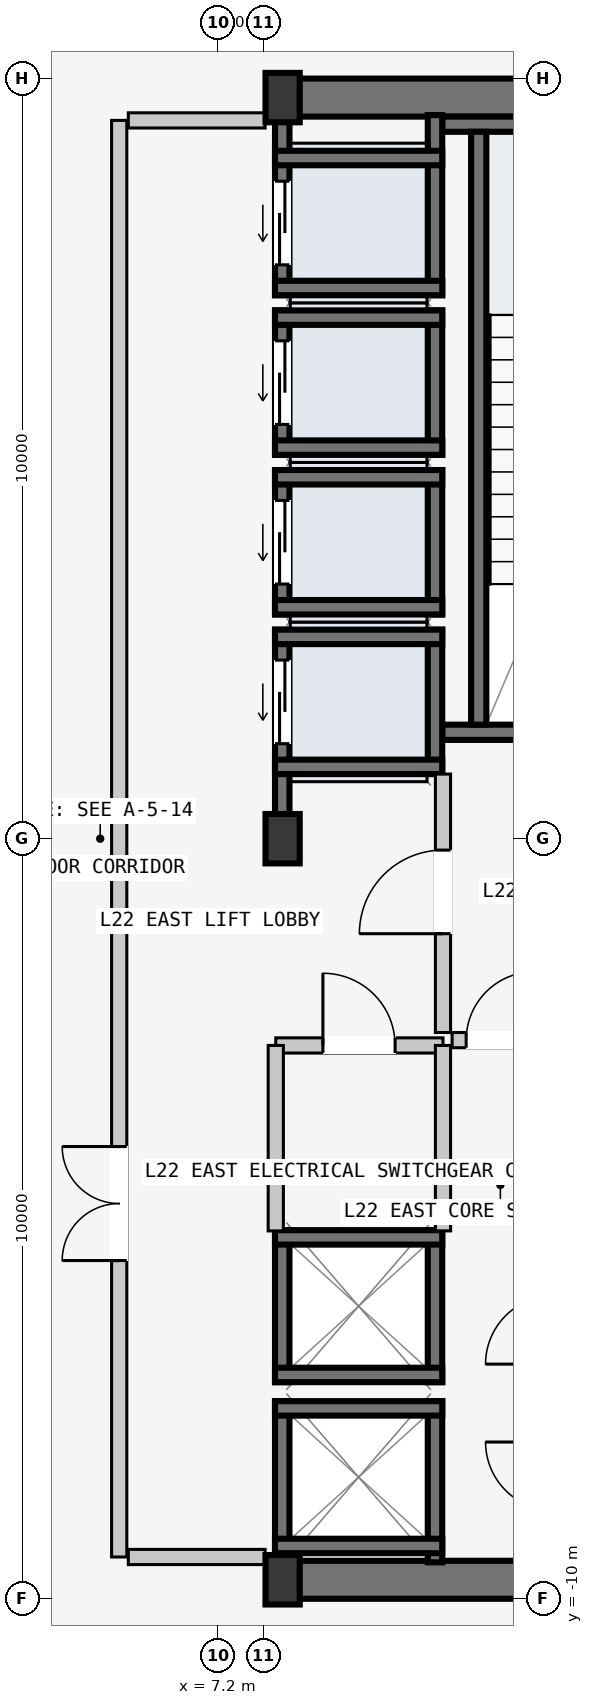
"""IFC4 building model, lengths in metres.
Left out: names, types, materials, properties, quantities, classifications, styles, units other than length and angle.
Written with IfcOpenShell. Run it as: python <this file> out.ifc"""

import sys

from ifc_helpers import new_model, si_unit, direction, frame, frame_2d, origin, origin_2d, place, context, subcontext, project, spatial, rectangle, i_section, extrude, element, fill, save


model = new_model("IFC4")
c1 = context("Model", 3, precision=1e-05, world=origin(), true_north=direction((0.0, 1.0)))
c2 = subcontext(c1, "Body", "Model", "MODEL_VIEW")
j1 = project(units=[si_unit("LENGTHUNIT", "METRE"), si_unit("PLANEANGLEUNIT", "RADIAN")], contexts=[c1])
p1 = place(None, origin())
s1 = spatial("IfcSite", under=j1, at=p1, CompositionType="ELEMENT")
p2 = place(p1, origin())
s2 = spatial("IfcBuilding", under=s1, at=p2, CompositionType="ELEMENT")
p3 = place(p2, frame((0.0, 0.0, 87.3)))
s3 = spatial("IfcBuildingStorey", under=s2, at=p3, CompositionType="ELEMENT", Elevation=87.3)
for number, where, z_axis, x_axis in (
    (1, (8.07, -9.75, -0.2), (0.0, 0.0, 1.0), (1.0, 0.0, 0.0)),
    (2, (8.07, 9.75, -0.2), (0.0, 0.0, 1.0), (1.0, 0.0, 0.0)),
):
    element("IfcWall", number, at=place(p3, frame(where, z_axis=z_axis, x_axis=x_axis)), inside=s3, PredefinedType="SHEAR", context=c2, shape_type="SweptSolid", body=[
        extrude(rectangle(XDim=6.46, YDim=0.5, at=frame_2d((3.23, 0.0))), origin(), (0.0, 0.0, 1.0), 4.5),
    ])
p4 = place(p3, frame((10.15, 1.4, -0.2), z_axis=(0.0, 0.0, 1.0), x_axis=(1.0, 0.0, 0.0)))
e3 = element("IfcWall", 3, at=p4, inside=s3, PredefinedType="SOLIDWALL", context=c2, shape_type="SweptSolid", body=[
    extrude(rectangle(XDim=4.1, YDim=0.2, at=frame_2d((2.05, 0.0))), origin(), (0.0, 0.0, 1.0), 4.5),
])
p5 = place(p4, frame((1.5, 0.0, 0.2)))
e4 = element("IfcOpeningElement", 4, at=p5, cuts=e3, PredefinedType="OPENING", context=c2, shape_type="SweptSolid", body=[
    extrude(rectangle(XDim=1.12, YDim=2.18, at=frame_2d((0.56, 1.09))), frame((0.0, 0.11, 0.0), z_axis=(0.0, -1.0, 0.0), x_axis=(1.0, 0.0, 0.0)), (0.0, 0.0, 1.0), 0.22),
])
p6 = place(p3, frame((10.15, 9.4, -0.2), z_axis=(0.0, 0.0, 1.0), x_axis=(1.0, 0.0, 0.0)))
e5 = element("IfcWall", 5, at=p6, inside=s3, PredefinedType="SOLIDWALL", context=c2, shape_type="SweptSolid", body=[
    extrude(rectangle(XDim=4.1, YDim=0.2, at=frame_2d((2.05, 0.0))), origin(), (0.0, 0.0, 1.0), 4.5),
])
p7 = place(p3, frame((10.63, 1.5, -0.2), z_axis=(0.0, 0.0, 1.0), x_axis=(0.0, 1.0, 0.0)))
e6 = element("IfcWall", 6, at=p7, inside=s3, PredefinedType="SOLIDWALL", context=c2, shape_type="SweptSolid", body=[
    extrude(rectangle(XDim=7.8, YDim=0.2, at=frame_2d((3.9, 0.0))), origin(), (0.0, 0.0, 1.0), 4.5),
])
for number, where, z_axis, x_axis in (
    (7, (8.05, -9.75, 0.0), (0.0, 0.0, 1.0), (1.0, 0.0, 0.0)),
    (8, (8.05, 0.0, 0.0), (0.0, 0.0, 1.0), (1.0, 0.0, 0.0)),
    (9, (8.05, 9.75, 0.0), (0.0, 0.0, 1.0), (1.0, 0.0, 0.0)),
):
    element("IfcColumn", number, at=place(p3, frame(where, z_axis=z_axis, x_axis=x_axis)), inside=s3, PredefinedType="COLUMN", context=c2, shape_type="SweptSolid", body=[
        extrude(i_section(OverallWidth=0.45, OverallDepth=0.65, WebThickness=0.025, FlangeThickness=0.04, at=origin_2d()), origin(), (0.0, 0.0, 1.0), 4.5),
    ])
p8 = place(p3, frame((8.045, 0.21, -0.2), z_axis=(0.0, 0.0, 1.0), x_axis=(0.0, 1.0, 0.0)))
e10 = element("IfcWall", 10, at=p8, inside=s3, PredefinedType="SOLIDWALL", context=c2, shape_type="SweptSolid", body=[
    extrude(rectangle(XDim=2.54, YDim=0.19, at=frame_2d((1.27, 0.0))), origin(), (0.0, 0.0, 1.0), 4.5),
])
p9 = place(p8, frame((1.04, 0.0, 0.2)))
e11 = element("IfcOpeningElement", 11, at=p9, cuts=e10, PredefinedType="OPENING", context=c2, shape_type="SweptSolid", body=[
    extrude(rectangle(XDim=1.1, YDim=2.2, at=frame_2d((0.55, 1.1))), frame((0.0, 0.105, 0.0), z_axis=(0.0, -1.0, 0.0), x_axis=(1.0, 0.0, 0.0)), (0.0, 0.0, 1.0), 0.21),
])
p10 = place(p3, frame((10.055, 0.85, -0.2), z_axis=(0.0, 0.0, 1.0), x_axis=(0.0, 1.0, 0.0)))
e12 = element("IfcWall", 12, at=p10, inside=s3, PredefinedType="SOLIDWALL", context=c2, shape_type="SweptSolid", body=[
    extrude(rectangle(XDim=1.9, YDim=0.19, at=frame_2d((0.95, 0.0))), origin(), (0.0, 0.0, 1.0), 4.5),
])
for number, where, z_axis, x_axis in (
    (13, (7.95, 2.655, -0.2), (0.0, 0.0, 1.0), (1.0, 0.0, 0.0)),
    (14, (7.95, 0.945, -0.2), (0.0, 0.0, 1.0), (1.0, 0.0, 0.0)),
):
    element("IfcWall", number, at=place(p3, frame(where, z_axis=z_axis, x_axis=x_axis)), inside=s3, PredefinedType="SOLIDWALL", context=c2, shape_type="SweptSolid", body=[
        extrude(rectangle(XDim=2.2, YDim=0.19, at=frame_2d((1.1, 0.0))), origin(), (0.0, 0.0, 1.0), 4.5),
    ])
p11 = place(p3, frame((8.045, 2.95, -0.2), z_axis=(0.0, 0.0, 1.0), x_axis=(0.0, 1.0, 0.0)))
e15 = element("IfcWall", 15, at=p11, inside=s3, PredefinedType="SOLIDWALL", context=c2, shape_type="SweptSolid", body=[
    extrude(rectangle(XDim=1.9, YDim=0.19, at=frame_2d((0.95, 0.0))), origin(), (0.0, 0.0, 1.0), 4.5),
])
p12 = place(p11, frame((0.4, 0.0, 0.2)))
e16 = element("IfcOpeningElement", 16, at=p12, cuts=e15, PredefinedType="OPENING", context=c2, shape_type="SweptSolid", body=[
    extrude(rectangle(XDim=1.1, YDim=2.2, at=frame_2d((0.55, 1.1))), frame((0.0, 0.105, 0.0), z_axis=(0.0, -1.0, 0.0), x_axis=(1.0, 0.0, 0.0)), (0.0, 0.0, 1.0), 0.21),
])
p13 = place(p3, frame((10.055, 2.95, -0.2), z_axis=(0.0, 0.0, 1.0), x_axis=(0.0, 1.0, 0.0)))
e17 = element("IfcWall", 17, at=p13, inside=s3, PredefinedType="SOLIDWALL", context=c2, shape_type="SweptSolid", body=[
    extrude(rectangle(XDim=1.9, YDim=0.19, at=frame_2d((0.95, 0.0))), origin(), (0.0, 0.0, 1.0), 4.5),
])
for number, where, z_axis, x_axis in (
    (18, (7.95, 4.755, -0.2), (0.0, 0.0, 1.0), (1.0, 0.0, 0.0)),
    (19, (7.95, 3.045, -0.2), (0.0, 0.0, 1.0), (1.0, 0.0, 0.0)),
):
    element("IfcWall", number, at=place(p3, frame(where, z_axis=z_axis, x_axis=x_axis)), inside=s3, PredefinedType="SOLIDWALL", context=c2, shape_type="SweptSolid", body=[
        extrude(rectangle(XDim=2.2, YDim=0.19, at=frame_2d((1.1, 0.0))), origin(), (0.0, 0.0, 1.0), 4.5),
    ])
p14 = place(p3, frame((8.045, 5.05, -0.2), z_axis=(0.0, 0.0, 1.0), x_axis=(0.0, 1.0, 0.0)))
e20 = element("IfcWall", 20, at=p14, inside=s3, PredefinedType="SOLIDWALL", context=c2, shape_type="SweptSolid", body=[
    extrude(rectangle(XDim=1.9, YDim=0.19, at=frame_2d((0.95, 0.0))), origin(), (0.0, 0.0, 1.0), 4.5),
])
p15 = place(p14, frame((0.4, 0.0, 0.2)))
e21 = element("IfcOpeningElement", 21, at=p15, cuts=e20, PredefinedType="OPENING", context=c2, shape_type="SweptSolid", body=[
    extrude(rectangle(XDim=1.1, YDim=2.2, at=frame_2d((0.55, 1.1))), frame((0.0, 0.105, 0.0), z_axis=(0.0, -1.0, 0.0), x_axis=(1.0, 0.0, 0.0)), (0.0, 0.0, 1.0), 0.21),
])
p16 = place(p3, frame((10.055, 5.05, -0.2), z_axis=(0.0, 0.0, 1.0), x_axis=(0.0, 1.0, 0.0)))
e22 = element("IfcWall", 22, at=p16, inside=s3, PredefinedType="SOLIDWALL", context=c2, shape_type="SweptSolid", body=[
    extrude(rectangle(XDim=1.9, YDim=0.19, at=frame_2d((0.95, 0.0))), origin(), (0.0, 0.0, 1.0), 4.5),
])
for number, where, z_axis, x_axis in (
    (23, (7.95, 6.855, -0.2), (0.0, 0.0, 1.0), (1.0, 0.0, 0.0)),
    (24, (7.95, 5.145, -0.2), (0.0, 0.0, 1.0), (1.0, 0.0, 0.0)),
):
    element("IfcWall", number, at=place(p3, frame(where, z_axis=z_axis, x_axis=x_axis)), inside=s3, PredefinedType="SOLIDWALL", context=c2, shape_type="SweptSolid", body=[
        extrude(rectangle(XDim=2.2, YDim=0.19, at=frame_2d((1.1, 0.0))), origin(), (0.0, 0.0, 1.0), 4.5),
    ])
p17 = place(p3, frame((8.045, 7.15, -0.2), z_axis=(0.0, 0.0, 1.0), x_axis=(0.0, 1.0, 0.0)))
e25 = element("IfcWall", 25, at=p17, inside=s3, PredefinedType="SOLIDWALL", context=c2, shape_type="SweptSolid", body=[
    extrude(rectangle(XDim=2.37, YDim=0.19, at=frame_2d((1.185, 0.0))), origin(), (0.0, 0.0, 1.0), 4.5),
])
p18 = place(p17, frame((0.4, 0.0, 0.2)))
e26 = element("IfcOpeningElement", 26, at=p18, cuts=e25, PredefinedType="OPENING", context=c2, shape_type="SweptSolid", body=[
    extrude(rectangle(XDim=1.1, YDim=2.2, at=frame_2d((0.55, 1.1))), frame((0.0, 0.105, 0.0), z_axis=(0.0, -1.0, 0.0), x_axis=(1.0, 0.0, 0.0)), (0.0, 0.0, 1.0), 0.21),
])
p19 = place(p3, frame((10.055, 7.15, -0.2), z_axis=(0.0, 0.0, 1.0), x_axis=(0.0, 1.0, 0.0)))
e27 = element("IfcWall", 27, at=p19, inside=s3, PredefinedType="SOLIDWALL", context=c2, shape_type="SweptSolid", body=[
    extrude(rectangle(XDim=2.37, YDim=0.19, at=frame_2d((1.185, 0.0))), origin(), (0.0, 0.0, 1.0), 4.5),
])
for number, where, z_axis, x_axis in (
    (28, (7.95, 8.955, -0.2), (0.0, 0.0, 1.0), (1.0, 0.0, 0.0)),
    (29, (7.95, 7.245, -0.2), (0.0, 0.0, 1.0), (1.0, 0.0, 0.0)),
):
    element("IfcWall", number, at=place(p3, frame(where, z_axis=z_axis, x_axis=x_axis)), inside=s3, PredefinedType="SOLIDWALL", context=c2, shape_type="SweptSolid", body=[
        extrude(rectangle(XDim=2.2, YDim=0.19, at=frame_2d((1.1, 0.0))), origin(), (0.0, 0.0, 1.0), 4.5),
    ])
for number, where, z_axis, x_axis in (
    (30, (8.045, -9.52, -0.2), (0.0, 0.0, 1.0), (0.0, 1.0, 0.0)),
    (31, (10.055, -9.52, -0.2), (0.0, 0.0, 1.0), (0.0, 1.0, 0.0)),
):
    element("IfcWall", number, at=place(p3, frame(where, z_axis=z_axis, x_axis=x_axis)), inside=s3, PredefinedType="SOLIDWALL", context=c2, shape_type="SweptSolid", body=[
        extrude(rectangle(XDim=2.12, YDim=0.19, at=frame_2d((1.06, 0.0))), origin(), (0.0, 0.0, 1.0), 4.5),
    ])
for number, where, z_axis, x_axis in (
    (32, (7.95, -7.495, -0.2), (0.0, 0.0, 1.0), (1.0, 0.0, 0.0)),
    (33, (7.95, -9.305, -0.2), (0.0, 0.0, 1.0), (1.0, 0.0, 0.0)),
):
    element("IfcWall", number, at=place(p3, frame(where, z_axis=z_axis, x_axis=x_axis)), inside=s3, PredefinedType="SOLIDWALL", context=c2, shape_type="SweptSolid", body=[
        extrude(rectangle(XDim=2.2, YDim=0.19, at=frame_2d((1.1, 0.0))), origin(), (0.0, 0.0, 1.0), 4.5),
    ])
for number, where, z_axis, x_axis in (
    (34, (8.045, -7.15, -0.2), (0.0, 0.0, 1.0), (0.0, 1.0, 0.0)),
    (35, (10.055, -7.15, -0.2), (0.0, 0.0, 1.0), (0.0, 1.0, 0.0)),
):
    element("IfcWall", number, at=place(p3, frame(where, z_axis=z_axis, x_axis=x_axis)), inside=s3, PredefinedType="SOLIDWALL", context=c2, shape_type="SweptSolid", body=[
        extrude(rectangle(XDim=2.0, YDim=0.19, at=frame_2d((1.0, 0.0))), origin(), (0.0, 0.0, 1.0), 4.5),
    ])
for number, where, z_axis, x_axis in (
    (36, (7.95, -5.245, -0.2), (0.0, 0.0, 1.0), (1.0, 0.0, 0.0)),
    (37, (7.95, -7.055, -0.2), (0.0, 0.0, 1.0), (1.0, 0.0, 0.0)),
):
    element("IfcWall", number, at=place(p3, frame(where, z_axis=z_axis, x_axis=x_axis)), inside=s3, PredefinedType="SOLIDWALL", context=c2, shape_type="SweptSolid", body=[
        extrude(rectangle(XDim=2.2, YDim=0.19, at=frame_2d((1.1, 0.0))), origin(), (0.0, 0.0, 1.0), 4.5),
    ])
p20 = place(p3, frame((5.9, -9.45, 0.0), z_axis=(0.0, 0.0, 1.0), x_axis=(0.0, 1.0, 0.0)))
e38 = element("IfcWall", 38, at=p20, inside=s3, PredefinedType="PARTITIONING", context=c2, shape_type="SweptSolid", body=[
    extrude(rectangle(XDim=18.9, YDim=0.2, at=frame_2d((9.45, 0.0))), origin(), (0.0, 0.0, 1.0), 4.3),
])
p21 = place(p20, frame((3.9, 0.0, 0.0)))
e39 = element("IfcOpeningElement", 39, at=p21, cuts=e38, PredefinedType="OPENING", context=c2, shape_type="SweptSolid", body=[
    extrude(rectangle(XDim=1.5, YDim=2.2, at=frame_2d((0.75, 1.1))), frame((0.0, 0.11, 0.0), z_axis=(0.0, -1.0, 0.0), x_axis=(1.0, 0.0, 0.0)), (0.0, 0.0, 1.0), 0.22),
])
for number, where, z_axis, x_axis in (
    (40, (6.02, -9.45, 0.0), (0.0, 0.0, 1.0), (1.0, 0.0, 0.0)),
    (41, (6.02, 9.45, 0.0), (0.0, 0.0, 1.0), (1.0, 0.0, 0.0)),
):
    element("IfcWall", number, at=place(p3, frame(where, z_axis=z_axis, x_axis=x_axis)), inside=s3, PredefinedType="PARTITIONING", context=c2, shape_type="SweptSolid", body=[
        extrude(rectangle(XDim=1.8, YDim=0.2, at=frame_2d((0.9, 0.0))), origin(), (0.0, 0.0, 1.0), 4.3),
    ])
p22 = place(p3, frame((10.16, -2.55, 0.0), z_axis=(0.0, 0.0, 1.0), x_axis=(0.0, 1.0, 0.0)))
e42 = element("IfcWall", 42, at=p22, inside=s3, PredefinedType="PARTITIONING", context=c2, shape_type="SweptSolid", body=[
    extrude(rectangle(XDim=3.4, YDim=0.2, at=frame_2d((1.7, 0.0))), origin(), (0.0, 0.0, 1.0), 4.3),
])
p23 = place(p22, frame((1.3, 0.0, 0.0)))
e43 = element("IfcOpeningElement", 43, at=p23, cuts=e42, PredefinedType="OPENING", context=c2, shape_type="SweptSolid", body=[
    extrude(rectangle(XDim=1.1, YDim=2.15, at=frame_2d((0.55, 1.075))), frame((0.0, 0.11, 0.0), z_axis=(0.0, -1.0, 0.0), x_axis=(1.0, 0.0, 0.0)), (0.0, 0.0, 1.0), 0.22),
])
p24 = place(p3, frame((10.28, -2.65, 0.0), z_axis=(0.0, 0.0, 1.0), x_axis=(1.0, 0.0, 0.0)))
e44 = element("IfcWall", 44, at=p24, inside=s3, PredefinedType="PARTITIONING", context=c2, shape_type="SweptSolid", body=[
    extrude(rectangle(XDim=1.27, YDim=0.2, at=frame_2d((0.635, 0.0))), origin(), (0.0, 0.0, 1.0), 4.3),
])
p25 = place(p24, frame((0.185, 0.0, 0.0)))
e45 = element("IfcOpeningElement", 45, at=p25, cuts=e44, PredefinedType="OPENING", context=c2, shape_type="SweptSolid", body=[
    extrude(rectangle(XDim=0.9, YDim=2.15, at=frame_2d((0.45, 1.075))), frame((0.0, 0.11, 0.0), z_axis=(0.0, -1.0, 0.0), x_axis=(1.0, 0.0, 0.0)), (0.0, 0.0, 1.0), 0.22),
])
p26 = place(p3, frame((7.96, -2.72, 0.0), z_axis=(0.0, 0.0, 1.0), x_axis=(1.0, 0.0, 0.0)))
e46 = element("IfcWall", 46, at=p26, inside=s3, PredefinedType="PARTITIONING", context=c2, shape_type="SweptSolid", body=[
    extrude(rectangle(XDim=2.2, YDim=0.2, at=frame_2d((1.1, 0.0))), origin(), (0.0, 0.0, 1.0), 4.3),
])
p27 = place(p26, frame((0.62, 0.0, 0.0)))
e47 = element("IfcOpeningElement", 47, at=p27, cuts=e46, PredefinedType="OPENING", context=c2, shape_type="SweptSolid", body=[
    extrude(rectangle(XDim=0.95, YDim=2.1, at=frame_2d((0.475, 1.05))), frame((0.0, 0.11, 0.0), z_axis=(0.0, -1.0, 0.0), x_axis=(1.0, 0.0, 0.0)), (0.0, 0.0, 1.0), 0.22),
])
for number, where, z_axis, x_axis in (
    (48, (7.96, -5.16, 0.0), (0.0, 0.0, 1.0), (0.0, 1.0, 0.0)),
    (49, (10.16, -5.16, 0.0), (0.0, 0.0, 1.0), (0.0, 1.0, 0.0)),
):
    element("IfcWall", number, at=place(p3, frame(where, z_axis=z_axis, x_axis=x_axis)), inside=s3, PredefinedType="PARTITIONING", context=c2, shape_type="SweptSolid", body=[
        extrude(rectangle(XDim=2.44, YDim=0.2, at=frame_2d((1.22, 0.0))), origin(), (0.0, 0.0, 1.0), 4.3),
    ])
p28 = place(p9, origin())
e50 = element("IfcDoor", 50, at=p28, inside=s3, OperationType="SLIDING_TO_LEFT", PredefinedType="DOOR", context=c2, shape_type="SweptSolid", body=[
    extrude(rectangle(XDim=1.1, YDim=2.2, at=frame_2d((0.55, 1.1))), frame((0.0, 0.025, 0.0), z_axis=(0.0, -1.0, 0.0), x_axis=(1.0, 0.0, 0.0)), (0.0, 0.0, 1.0), 0.05),
])
fill(e11, e50)
p29 = place(p12, origin())
e51 = element("IfcDoor", 51, at=p29, inside=s3, OperationType="SLIDING_TO_LEFT", PredefinedType="DOOR", context=c2, shape_type="SweptSolid", body=[
    extrude(rectangle(XDim=1.1, YDim=2.2, at=frame_2d((0.55, 1.1))), frame((0.0, 0.025, 0.0), z_axis=(0.0, -1.0, 0.0), x_axis=(1.0, 0.0, 0.0)), (0.0, 0.0, 1.0), 0.05),
])
fill(e16, e51)
p30 = place(p15, origin())
e52 = element("IfcDoor", 52, at=p30, inside=s3, OperationType="SLIDING_TO_LEFT", PredefinedType="DOOR", context=c2, shape_type="SweptSolid", body=[
    extrude(rectangle(XDim=1.1, YDim=2.2, at=frame_2d((0.55, 1.1))), frame((0.0, 0.025, 0.0), z_axis=(0.0, -1.0, 0.0), x_axis=(1.0, 0.0, 0.0)), (0.0, 0.0, 1.0), 0.05),
])
fill(e21, e52)
p31 = place(p18, origin())
e53 = element("IfcDoor", 53, at=p31, inside=s3, OperationType="SLIDING_TO_LEFT", PredefinedType="DOOR", context=c2, shape_type="SweptSolid", body=[
    extrude(rectangle(XDim=1.1, YDim=2.2, at=frame_2d((0.55, 1.1))), frame((0.0, 0.025, 0.0), z_axis=(0.0, -1.0, 0.0), x_axis=(1.0, 0.0, 0.0)), (0.0, 0.0, 1.0), 0.05),
])
fill(e26, e53)
p32 = place(p21, origin())
e54 = element("IfcDoor", 54, at=p32, inside=s3, OperationType="DOUBLE_DOOR_SINGLE_SWING", PredefinedType="DOOR", context=c2, shape_type="SweptSolid", body=[
    extrude(rectangle(XDim=1.5, YDim=2.2, at=frame_2d((0.75, 1.1))), frame((0.0, 0.025, 0.0), z_axis=(0.0, -1.0, 0.0), x_axis=(1.0, 0.0, 0.0)), (0.0, 0.0, 1.0), 0.05),
])
fill(e39, e54)
p33 = place(p23, origin())
e55 = element("IfcDoor", 55, at=p33, inside=s3, OperationType="SINGLE_SWING_LEFT", PredefinedType="DOOR", context=c2, shape_type="SweptSolid", body=[
    extrude(rectangle(XDim=1.1, YDim=2.15, at=frame_2d((0.55, 1.075))), frame((0.0, 0.025, 0.0), z_axis=(0.0, -1.0, 0.0), x_axis=(1.0, 0.0, 0.0)), (0.0, 0.0, 1.0), 0.05),
])
fill(e43, e55)
p34 = place(p25, origin())
e56 = element("IfcDoor", 56, at=p34, inside=s3, OperationType="SINGLE_SWING_RIGHT", PredefinedType="DOOR", context=c2, shape_type="SweptSolid", body=[
    extrude(rectangle(XDim=0.9, YDim=2.15, at=frame_2d((0.45, 1.075))), frame((0.0, 0.025, 0.0), z_axis=(0.0, -1.0, 0.0), x_axis=(1.0, 0.0, 0.0)), (0.0, 0.0, 1.0), 0.05),
])
fill(e45, e56)
p35 = place(p27, origin())
e57 = element("IfcDoor", 57, at=p35, inside=s3, OperationType="SINGLE_SWING_LEFT", PredefinedType="DOOR", context=c2, shape_type="SweptSolid", body=[
    extrude(rectangle(XDim=0.95, YDim=2.1, at=frame_2d((0.475, 1.05))), frame((0.0, 0.025, 0.0), z_axis=(0.0, -1.0, 0.0), x_axis=(1.0, 0.0, 0.0)), (0.0, 0.0, 1.0), 0.05),
])
fill(e47, e57)
save(model, sys.argv[1])
